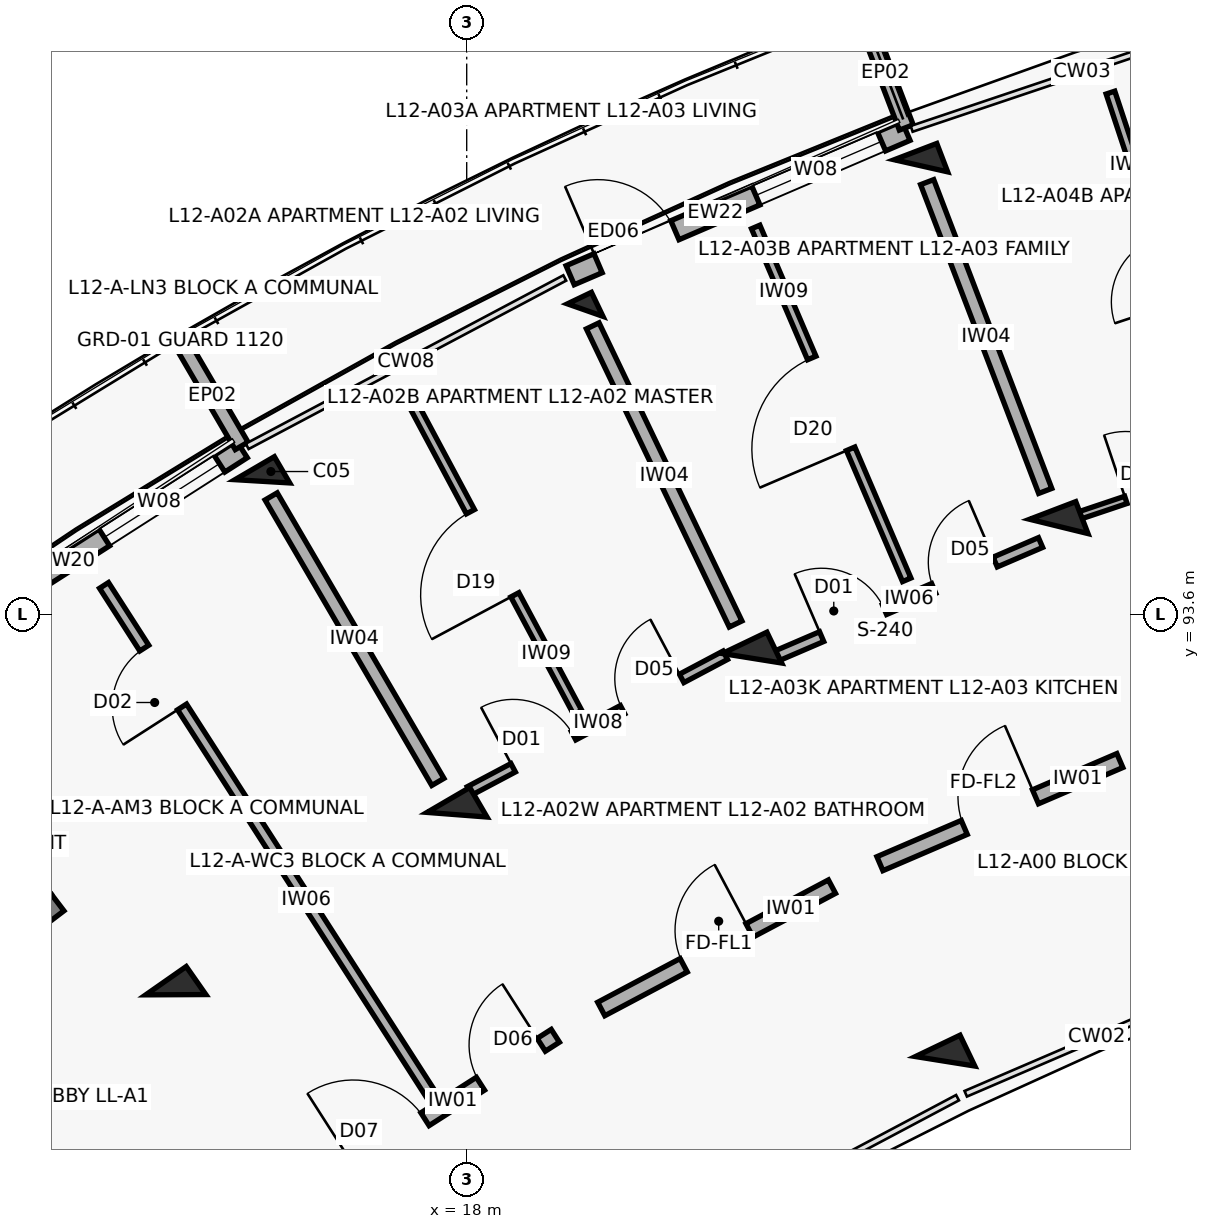
"""IFC4 building model, lengths in metres.
Left out: names, types, materials, properties, quantities, classifications, styles, units other than length and angle.
Written with IfcOpenShell. Run it as: python <this file> out.ifc"""

import sys

from ifc_helpers import new_model, si_unit, direction, frame, frame_2d, origin, origin_2d, place, context, subcontext, project, spatial, rectangle, extrude, element, fill, save


model = new_model("IFC4")
c1 = context("Model", 3, precision=1e-05, world=origin(), true_north=direction((0.0, 1.0)))
c2 = subcontext(c1, "Body", "Model", "MODEL_VIEW")
j1 = project(units=[si_unit("LENGTHUNIT", "METRE"), si_unit("PLANEANGLEUNIT", "RADIAN")], contexts=[c1])
p1 = place(None, origin())
s1 = spatial("IfcSite", under=j1, at=p1, CompositionType="ELEMENT")
p2 = place(p1, origin())
s2 = spatial("IfcBuilding", under=s1, at=p2, CompositionType="ELEMENT")
p3 = place(p2, frame((0.0, 0.0, 39.1)))
s3 = spatial("IfcBuildingStorey", under=s2, at=p3, CompositionType="ELEMENT", Elevation=39.1)
for number, where, z_axis, x_axis in (
    (1, (14.172, 88.592, 0.0), (0.0, 0.0, 1.0), (-0.573, 0.82, 0.0)),
    (2, (17.873, 90.96, 0.0), (0.0, 0.0, 1.0), (-0.504, 0.864, 0.0)),
):
    element("IfcColumn", number, at=place(p3, frame(where, z_axis=z_axis, x_axis=x_axis)), inside=s3, PredefinedType="COLUMN", context=c2, shape_type="SweptSolid", body=[
        extrude(rectangle(XDim=0.45, YDim=0.65, at=origin_2d()), origin(), (0.0, 0.0, 1.0), 3.1),
    ])
p4 = place(p3, frame((15.311, 95.347, 0.0), z_axis=(0.0, 0.0, 1.0), x_axis=(-0.504226211181, 0.863571611366, 0.0)))
e3 = element("IfcColumn", 3, at=p4, inside=s3, PredefinedType="COLUMN", context=c2, shape_type="SweptSolid", body=[
    extrude(rectangle(XDim=0.4, YDim=0.6, at=origin_2d()), origin(), (0.0, 0.0, 1.0), 3.1),
])
for number, where, z_axis, x_axis in (
    (4, (24.294, 87.716, 0.0), (0.0, 0.0, 1.0), (-0.432, 0.902, 0.0)),
    (5, (21.754, 93.019, 0.0), (0.0, 0.0, 1.0), (-0.432, 0.902, 0.0)),
):
    element("IfcColumn", number, at=place(p3, frame(where, z_axis=z_axis, x_axis=x_axis)), inside=s3, PredefinedType="COLUMN", context=c2, shape_type="SweptSolid", body=[
        extrude(rectangle(XDim=0.45, YDim=0.65, at=origin_2d()), origin(), (0.0, 0.0, 1.0), 3.1),
    ])
p5 = place(p3, frame((19.559, 97.6, 0.0), z_axis=(0.0, 0.0, 1.0), x_axis=(-0.432085748802, 0.901832526405, 0.0)))
e6 = element("IfcColumn", 6, at=p5, inside=s3, PredefinedType="COLUMN", context=c2, shape_type="SweptSolid", body=[
    extrude(rectangle(XDim=0.35, YDim=0.35, at=origin_2d()), origin(), (0.0, 0.0, 1.0), 3.1),
])
p6 = place(p3, frame((25.79, 94.753, 0.0), z_axis=(0.0, 0.0, 1.0), x_axis=(-0.357064076459, 0.934079892355, 0.0)))
e7 = element("IfcColumn", 7, at=p6, inside=s3, PredefinedType="COLUMN", context=c2, shape_type="SweptSolid", body=[
    extrude(rectangle(XDim=0.45, YDim=0.65, at=origin_2d()), origin(), (0.0, 0.0, 1.0), 3.1),
])
p7 = place(p3, frame((23.976, 99.499, 0.0), z_axis=(0.0, 0.0, 1.0), x_axis=(-0.357064076459, 0.934079892355, 0.0)))
e8 = element("IfcColumn", 8, at=p7, inside=s3, PredefinedType="COLUMN", context=c2, shape_type="SweptSolid", body=[
    extrude(rectangle(XDim=0.4, YDim=0.6, at=origin_2d()), origin(), (0.0, 0.0, 1.0), 3.1),
])
p8 = place(p3, frame((10.992, 93.176, 0.0), z_axis=(0.0, 0.0, 1.0), x_axis=(0.84226218024, 0.539068103061, 0.0)))
e9 = element("IfcWall", 9, at=p8, inside=s3, PredefinedType="SOLIDWALL", context=c2, shape_type="SweptSolid", body=[
    extrude(rectangle(XDim=4.809, YDim=0.262, at=frame_2d((2.404, 0.0))), origin(), (0.0, 0.0, 1.0), 2.25),
])
p9 = place(p8, frame((0.4, 0.0, 0.0)))
e10 = element("IfcOpeningElement", 10, at=p9, cuts=e9, PredefinedType="OPENING", context=c2, shape_type="SweptSolid", body=[
    extrude(rectangle(XDim=1.1, YDim=2.15, at=frame_2d((0.55, 1.075))), frame((0.0, 0.141, 0.0), z_axis=(0.0, -1.0, 0.0), x_axis=(1.0, 0.0, 0.0)), (0.0, 0.0, 1.0), 0.282),
])
p10 = place(p8, frame((2.659, 0.0, 0.35)))
e11 = element("IfcOpeningElement", 11, at=p10, cuts=e9, PredefinedType="OPENING", context=c2, shape_type="SweptSolid", body=[
    extrude(rectangle(XDim=1.8, YDim=1.65, at=frame_2d((0.9, 0.825))), frame((0.0, 0.141, 0.0), z_axis=(0.0, -1.0, 0.0), x_axis=(1.0, 0.0, 0.0)), (0.0, 0.0, 1.0), 0.282),
])
p11 = place(p3, frame((15.039, 95.813, 0.0), z_axis=(0.0, 0.0, 1.0), x_axis=(-0.504228145431, 0.863570481985, 0.0)))
e12 = element("IfcWall", 12, at=p11, inside=s3, PredefinedType="PARAPET", context=c2, shape_type="SweptSolid", body=[
    extrude(rectangle(XDim=1.53, YDim=0.195, at=frame_2d((0.765, 0.0))), origin(), (0.0, 0.0, 1.0), 2.25),
])
p12 = place(p3, frame((19.361, 98.059, 0.0), z_axis=(0.0, 0.0, 1.0), x_axis=(0.918711189033, 0.394930058548, 0.0)))
e13 = element("IfcWall", 13, at=p12, inside=s3, PredefinedType="SOLIDWALL", context=c2, shape_type="SweptSolid", body=[
    extrude(rectangle(XDim=4.809, YDim=0.272, at=frame_2d((2.404, 0.0))), origin(), (0.0, 0.0, 1.0), 2.25),
])
p13 = place(p12, frame((0.4, 0.0, 0.0)))
e14 = element("IfcOpeningElement", 14, at=p13, cuts=e13, PredefinedType="OPENING", context=c2, shape_type="SweptSolid", body=[
    extrude(rectangle(XDim=1.1, YDim=2.15, at=frame_2d((0.55, 1.075))), frame((0.0, 0.146, 0.0), z_axis=(0.0, -1.0, 0.0), x_axis=(1.0, 0.0, 0.0)), (0.0, 0.0, 1.0), 0.292),
])
p14 = place(p12, frame((2.659, 0.0, 0.35)))
e15 = element("IfcOpeningElement", 15, at=p14, cuts=e13, PredefinedType="OPENING", context=c2, shape_type="SweptSolid", body=[
    extrude(rectangle(XDim=1.8, YDim=1.65, at=frame_2d((0.9, 0.825))), frame((0.0, 0.146, 0.0), z_axis=(0.0, -1.0, 0.0), x_axis=(1.0, 0.0, 0.0)), (0.0, 0.0, 1.0), 0.292),
])
p15 = place(p3, frame((23.783, 100.003, 0.0), z_axis=(0.0, 0.0, 1.0), x_axis=(-0.356957296461, 0.934120703391, 0.0)))
e16 = element("IfcWall", 16, at=p15, inside=s3, PredefinedType="PARAPET", context=c2, shape_type="SweptSolid", body=[
    extrude(rectangle(XDim=1.53, YDim=0.195, at=frame_2d((0.765, 0.0))), origin(), (0.0, 0.0, 1.0), 2.25),
])
p16 = place(p3, frame((12.616, 89.807, 0.0), z_axis=(0.0, 0.0, 1.0), x_axis=(-0.795474703455, -0.605986795371, 0.0)))
e17 = element("IfcWall", 17, at=p16, inside=s3, PredefinedType="SHEAR", context=c2, shape_type="SweptSolid", body=[
    extrude(rectangle(XDim=3.39, YDim=0.28, at=frame_2d((1.695, 0.0))), origin(), (0.0, 0.0, 1.0), 3.1),
])
p17 = place(p16, frame((1.095, 0.0, 0.0)))
e18 = element("IfcOpeningElement", 18, at=p17, cuts=e17, PredefinedType="OPENING", context=c2, shape_type="SweptSolid", body=[
    extrude(rectangle(XDim=1.2, YDim=2.15, at=frame_2d((0.6, 1.075))), frame((0.0, 0.15, 0.0), z_axis=(0.0, -1.0, 0.0), x_axis=(1.0, 0.0, 0.0)), (0.0, 0.0, 1.0), 0.3),
])
p18 = place(p3, frame((16.272, 86.199, 0.0), z_axis=(0.0, 0.0, 1.0), x_axis=(0.842257205985, 0.539075874963, 0.0)))
e19 = element("IfcWall", 19, at=p18, inside=s3, PredefinedType="SOLIDWALL", context=c2, shape_type="SweptSolid", body=[
    extrude(rectangle(XDim=3.436, YDim=0.2, at=frame_2d((1.718, 0.0))), origin(), (0.0, 0.0, 1.0), 2.08),
])
p19 = place(p18, frame((0.28, 0.0, 0.0)))
e20 = element("IfcOpeningElement", 20, at=p19, cuts=e19, PredefinedType="OPENING", context=c2, shape_type="SweptSolid", body=[
    extrude(rectangle(XDim=1.12, YDim=2.15, at=frame_2d((0.56, 1.075))), frame((0.0, 0.11, 0.0), z_axis=(0.0, -1.0, 0.0), x_axis=(1.0, 0.0, 0.0)), (0.0, 0.0, 1.0), 0.22),
])
p20 = place(p18, frame((2.266, 0.0, 0.0)))
e21 = element("IfcOpeningElement", 21, at=p20, cuts=e19, PredefinedType="OPENING", context=c2, shape_type="SweptSolid", body=[
    extrude(rectangle(XDim=0.95, YDim=2.1, at=frame_2d((0.475, 1.05))), frame((0.0, 0.11, 0.0), z_axis=(0.0, -1.0, 0.0), x_axis=(1.0, 0.0, 0.0)), (0.0, 0.0, 1.0), 0.22),
])
p21 = place(p3, frame((17.524, 87.288, 0.0), z_axis=(0.0, 0.0, 1.0), x_axis=(-0.540338452216, 0.841447774408, 0.0)))
e22 = element("IfcWall", 22, at=p21, inside=s3, PredefinedType="PARTITIONING", context=c2, shape_type="SweptSolid", body=[
    extrude(rectangle(XDim=7.95, YDim=0.14, at=frame_2d((3.975, 0.0))), origin(), (0.0, 0.0, 1.0), 2.08),
])
p22 = place(p21, frame((6.05, 0.0, 0.0)))
e23 = element("IfcOpeningElement", 23, at=p22, cuts=e22, PredefinedType="OPENING", context=c2, shape_type="SweptSolid", body=[
    extrude(rectangle(XDim=0.92, YDim=2.1, at=frame_2d((0.46, 1.05))), frame((0.0, 0.08, 0.0), z_axis=(0.0, -1.0, 0.0), x_axis=(1.0, 0.0, 0.0)), (0.0, 0.0, 1.0), 0.16),
])
p23 = place(p3, frame((19.77, 88.404, 0.0), z_axis=(0.0, 0.0, 1.0), x_axis=(0.883410853063, 0.468599258099, 0.0)))
e24 = element("IfcWall", 24, at=p23, inside=s3, PredefinedType="SOLIDWALL", context=c2, shape_type="SweptSolid", body=[
    extrude(rectangle(XDim=3.436, YDim=0.2, at=frame_2d((1.718, 0.0))), origin(), (0.0, 0.0, 1.0), 2.08),
])
p24 = place(p23, frame((1.228, 0.0, 0.0)))
e25 = element("IfcOpeningElement", 25, at=p24, cuts=e24, PredefinedType="OPENING", context=c2, shape_type="SweptSolid", body=[
    extrude(rectangle(XDim=0.98, YDim=2.15, at=frame_2d((0.49, 1.075))), frame((0.0, 0.11, 0.0), z_axis=(0.0, -1.0, 0.0), x_axis=(1.0, 0.0, 0.0)), (0.0, 0.0, 1.0), 0.22),
])
p25 = place(p3, frame((18.037, 91.273, 0.0), z_axis=(0.0, 0.0, 1.0), x_axis=(0.883441603894, 0.468541281543, 0.0)))
e26 = element("IfcWall", 26, at=p25, inside=s3, PredefinedType="PARTITIONING", context=c2, shape_type="SweptSolid", body=[
    extrude(rectangle(XDim=3.81, YDim=0.125, at=frame_2d((1.905, 0.0))), origin(), (0.0, 0.0, 1.0), 2.08),
])
p26 = place(p25, frame((0.65, 0.0, 0.0)))
e27 = element("IfcOpeningElement", 27, at=p26, cuts=e26, PredefinedType="OPENING", context=c2, shape_type="SweptSolid", body=[
    extrude(rectangle(XDim=0.9, YDim=2.1, at=frame_2d((0.45, 1.05))), frame((0.0, 0.073, 0.0), z_axis=(0.0, -1.0, 0.0), x_axis=(1.0, 0.0, 0.0)), (0.0, 0.0, 1.0), 0.145),
])
p27 = place(p25, frame((2.28, 0.0, 0.0)))
e28 = element("IfcOpeningElement", 28, at=p27, cuts=e26, PredefinedType="OPENING", context=c2, shape_type="SweptSolid", body=[
    extrude(rectangle(XDim=0.88, YDim=2.1, at=frame_2d((0.44, 1.05))), frame((0.0, 0.073, 0.0), z_axis=(0.0, -1.0, 0.0), x_axis=(1.0, 0.0, 0.0)), (0.0, 0.0, 1.0), 0.145),
])
p28 = place(p3, frame((19.46, 92.306, 0.0), z_axis=(0.0, 0.0, 1.0), x_axis=(-0.471228378949, 0.88201123285, 0.0)))
e29 = element("IfcWall", 29, at=p28, inside=s3, PredefinedType="PARTITIONING", context=c2, shape_type="SweptSolid", body=[
    extrude(rectangle(XDim=4.75, YDim=0.12, at=frame_2d((2.375, 0.0))), origin(), (0.0, 0.0, 1.0), 2.08),
])
p29 = place(p28, frame((1.755, 0.0, 0.0)))
e30 = element("IfcOpeningElement", 30, at=p29, cuts=e29, PredefinedType="OPENING", context=c2, shape_type="SweptSolid", body=[
    extrude(rectangle(XDim=1.24, YDim=2.1, at=frame_2d((0.62, 1.05))), frame((0.0, 0.07, 0.0), z_axis=(0.0, -1.0, 0.0), x_axis=(1.0, 0.0, 0.0)), (0.0, 0.0, 1.0), 0.14),
])
p30 = place(p3, frame((17.621, 91.392, 0.0), z_axis=(0.0, 0.0, 1.0), x_axis=(-0.504216452091, 0.863577309475, 0.0)))
e31 = element("IfcWall", 31, at=p30, inside=s3, PredefinedType="SOLIDWALL", context=c2, shape_type="SweptSolid", body=[
    extrude(rectangle(XDim=4.35, YDim=0.185, at=frame_2d((2.175, 0.0))), origin(), (0.0, 0.0, 1.0), 2.08),
])
p31 = place(p3, frame((23.437, 90.316, 0.0), z_axis=(0.0, 0.0, 1.0), x_axis=(0.918718172399, 0.394913813008, 0.0)))
e32 = element("IfcWall", 32, at=p31, inside=s3, PredefinedType="SOLIDWALL", context=c2, shape_type="SweptSolid", body=[
    extrude(rectangle(XDim=3.436, YDim=0.2, at=frame_2d((1.718, 0.0))), origin(), (0.0, 0.0, 1.0), 2.08),
])
p32 = place(p31, frame((1.208, 0.0, 0.0)))
e33 = element("IfcOpeningElement", 33, at=p32, cuts=e32, PredefinedType="OPENING", context=c2, shape_type="SweptSolid", body=[
    extrude(rectangle(XDim=1.02, YDim=2.15, at=frame_2d((0.51, 1.075))), frame((0.0, 0.11, 0.0), z_axis=(0.0, -1.0, 0.0), x_axis=(1.0, 0.0, 0.0)), (0.0, 0.0, 1.0), 0.22),
])
p33 = place(p3, frame((22.073, 93.047, 0.0), z_axis=(0.0, 0.0, 1.0), x_axis=(0.918737522346, 0.394868794707, 0.0)))
e34 = element("IfcWall", 34, at=p33, inside=s3, PredefinedType="PARTITIONING", context=c2, shape_type="SweptSolid", body=[
    extrude(rectangle(XDim=3.785, YDim=0.14, at=frame_2d((1.893, 0.0))), origin(), (0.0, 0.0, 1.0), 2.08),
])
p34 = place(p33, frame((0.65, 0.0, 0.0)))
e35 = element("IfcOpeningElement", 35, at=p34, cuts=e34, PredefinedType="OPENING", context=c2, shape_type="SweptSolid", body=[
    extrude(rectangle(XDim=0.9, YDim=2.1, at=frame_2d((0.45, 1.05))), frame((0.0, 0.08, 0.0), z_axis=(0.0, -1.0, 0.0), x_axis=(1.0, 0.0, 0.0)), (0.0, 0.0, 1.0), 0.16),
])
p35 = place(p33, frame((2.255, 0.0, 0.0)))
e36 = element("IfcOpeningElement", 36, at=p35, cuts=e34, PredefinedType="OPENING", context=c2, shape_type="SweptSolid", body=[
    extrude(rectangle(XDim=0.88, YDim=2.1, at=frame_2d((0.44, 1.05))), frame((0.0, 0.08, 0.0), z_axis=(0.0, -1.0, 0.0), x_axis=(1.0, 0.0, 0.0)), (0.0, 0.0, 1.0), 0.16),
])
p36 = place(p3, frame((23.789, 94.051, 0.0), z_axis=(0.0, 0.0, 1.0), x_axis=(-0.393539995583, 0.919307495823, 0.0)))
e37 = element("IfcWall", 37, at=p36, inside=s3, PredefinedType="PARTITIONING", context=c2, shape_type="SweptSolid", body=[
    extrude(rectangle(XDim=5.05, YDim=0.12, at=frame_2d((2.525, 0.0))), origin(), (0.0, 0.0, 1.0), 2.08),
])
p37 = place(p36, frame((1.875, 0.0, 0.0)))
e38 = element("IfcOpeningElement", 38, at=p37, cuts=e37, PredefinedType="OPENING", context=c2, shape_type="SweptSolid", body=[
    extrude(rectangle(XDim=1.3, YDim=2.1, at=frame_2d((0.65, 1.05))), frame((0.0, 0.07, 0.0), z_axis=(0.0, -1.0, 0.0), x_axis=(1.0, 0.0, 0.0)), (0.0, 0.0, 1.0), 0.14),
])
p38 = place(p3, frame((21.538, 93.469, 0.0), z_axis=(0.0, 0.0, 1.0), x_axis=(-0.432086898897, 0.901831975371, 0.0)))
e39 = element("IfcWall", 39, at=p38, inside=s3, PredefinedType="SOLIDWALL", context=c2, shape_type="SweptSolid", body=[
    extrude(rectangle(XDim=4.35, YDim=0.185, at=frame_2d((2.175, 0.0))), origin(), (0.0, 0.0, 1.0), 2.08),
])
p39 = place(p3, frame((26.056, 94.896, 0.0), z_axis=(0.0, 0.0, 1.0), x_axis=(0.947876567739, 0.318637744673, 0.0)))
e40 = element("IfcWall", 40, at=p39, inside=s3, PredefinedType="PARTITIONING", context=c2, shape_type="SweptSolid", body=[
    extrude(rectangle(XDim=3.797, YDim=0.1, at=frame_2d((1.899, 0.0))), origin(), (0.0, 0.0, 1.0), 2.08),
])
p40 = place(p39, frame((0.65, 0.0, 0.0)))
e41 = element("IfcOpeningElement", 41, at=p40, cuts=e40, PredefinedType="OPENING", context=c2, shape_type="SweptSolid", body=[
    extrude(rectangle(XDim=0.9, YDim=2.1, at=frame_2d((0.45, 1.05))), frame((0.0, 0.06, 0.0), z_axis=(0.0, -1.0, 0.0), x_axis=(1.0, 0.0, 0.0)), (0.0, 0.0, 1.0), 0.12),
])
p41 = place(p39, frame((2.267, 0.0, 0.0)))
e42 = element("IfcOpeningElement", 42, at=p41, cuts=e40, PredefinedType="OPENING", context=c2, shape_type="SweptSolid", body=[
    extrude(rectangle(XDim=0.88, YDim=2.1, at=frame_2d((0.44, 1.05))), frame((0.0, 0.06, 0.0), z_axis=(0.0, -1.0, 0.0), x_axis=(1.0, 0.0, 0.0)), (0.0, 0.0, 1.0), 0.12),
])
p42 = place(p3, frame((28.01, 95.81, 0.0), z_axis=(0.0, 0.0, 1.0), x_axis=(-0.314343770763, 0.949309219266, 0.0)))
e43 = element("IfcWall", 43, at=p42, inside=s3, PredefinedType="PARTITIONING", context=c2, shape_type="SweptSolid", body=[
    extrude(rectangle(XDim=4.9, YDim=0.12, at=frame_2d((2.45, 0.0))), origin(), (0.0, 0.0, 1.0), 2.08),
])
p43 = place(p42, frame((2.0, 0.0, 0.0)))
e44 = element("IfcOpeningElement", 44, at=p43, cuts=e43, PredefinedType="OPENING", context=c2, shape_type="SweptSolid", body=[
    extrude(rectangle(XDim=0.9, YDim=2.1, at=frame_2d((0.45, 1.05))), frame((0.0, 0.07, 0.0), z_axis=(0.0, -1.0, 0.0), x_axis=(1.0, 0.0, 0.0)), (0.0, 0.0, 1.0), 0.14),
])
p44 = place(p3, frame((25.611, 95.22, 0.0), z_axis=(0.0, 0.0, 1.0), x_axis=(-0.357064016205, 0.934079915388, 0.0)))
e45 = element("IfcWall", 45, at=p44, inside=s3, PredefinedType="SOLIDWALL", context=c2, shape_type="SweptSolid", body=[
    extrude(rectangle(XDim=4.35, YDim=0.185, at=frame_2d((2.175, 0.0))), origin(), (0.0, 0.0, 1.0), 2.08),
])
p45 = place(p10, origin())
e46 = element("IfcWindow", 46, at=p45, inside=s3, PartitioningType="TRIPLE_PANEL_VERTICAL", PredefinedType="WINDOW", context=c2, shape_type="SweptSolid", body=[
    extrude(rectangle(XDim=1.8, YDim=1.65, at=frame_2d((0.9, 0.825))), frame((0.0, 0.03, 0.0), z_axis=(0.0, -1.0, 0.0), x_axis=(1.0, 0.0, 0.0)), (0.0, 0.0, 1.0), 0.06),
])
fill(e11, e46)
p46 = place(p13, origin())
e47 = element("IfcDoor", 47, at=p46, inside=s3, OperationType="SINGLE_SWING_LEFT", PredefinedType="DOOR", context=c2, shape_type="SweptSolid", body=[
    extrude(rectangle(XDim=1.1, YDim=2.15, at=frame_2d((0.55, 1.075))), frame((0.0, 0.025, 0.0), z_axis=(0.0, -1.0, 0.0), x_axis=(1.0, 0.0, 0.0)), (0.0, 0.0, 1.0), 0.05),
])
fill(e14, e47)
p47 = place(p14, origin())
e48 = element("IfcWindow", 48, at=p47, inside=s3, PartitioningType="TRIPLE_PANEL_VERTICAL", PredefinedType="WINDOW", context=c2, shape_type="SweptSolid", body=[
    extrude(rectangle(XDim=1.8, YDim=1.65, at=frame_2d((0.9, 0.825))), frame((0.0, 0.03, 0.0), z_axis=(0.0, -1.0, 0.0), x_axis=(1.0, 0.0, 0.0)), (0.0, 0.0, 1.0), 0.06),
])
fill(e15, e48)
p48 = place(p19, origin())
e49 = element("IfcDoor", 49, at=p48, inside=s3, OperationType="SINGLE_SWING_LEFT", PredefinedType="DOOR", context=c2, shape_type="SweptSolid", body=[
    extrude(rectangle(XDim=1.12, YDim=2.15, at=frame_2d((0.56, 1.075))), frame((0.0, 0.025, 0.0), z_axis=(0.0, -1.0, 0.0), x_axis=(1.0, 0.0, 0.0)), (0.0, 0.0, 1.0), 0.05),
])
fill(e20, e49)
p49 = place(p20, origin())
e50 = element("IfcDoor", 50, at=p49, inside=s3, OperationType="SINGLE_SWING_RIGHT", PredefinedType="DOOR", context=c2, shape_type="SweptSolid", body=[
    extrude(rectangle(XDim=0.95, YDim=2.1, at=frame_2d((0.475, 1.05))), frame((0.0, 0.025, 0.0), z_axis=(0.0, -1.0, 0.0), x_axis=(1.0, 0.0, 0.0)), (0.0, 0.0, 1.0), 0.05),
])
fill(e21, e50)
p50 = place(p22, origin())
e51 = element("IfcDoor", 51, at=p50, inside=s3, OperationType="SINGLE_SWING_LEFT", PredefinedType="DOOR", context=c2, shape_type="SweptSolid", body=[
    extrude(rectangle(XDim=0.92, YDim=2.1, at=frame_2d((0.46, 1.05))), frame((0.0, 0.025, 0.0), z_axis=(0.0, -1.0, 0.0), x_axis=(1.0, 0.0, 0.0)), (0.0, 0.0, 1.0), 0.05),
])
fill(e23, e51)
p51 = place(p24, origin())
e52 = element("IfcDoor", 52, at=p51, inside=s3, OperationType="SINGLE_SWING_RIGHT", PredefinedType="DOOR", context=c2, shape_type="SweptSolid", body=[
    extrude(rectangle(XDim=0.98, YDim=2.15, at=frame_2d((0.49, 1.075))), frame((0.0, 0.025, 0.0), z_axis=(0.0, -1.0, 0.0), x_axis=(1.0, 0.0, 0.0)), (0.0, 0.0, 1.0), 0.05),
])
fill(e25, e52)
p52 = place(p26, origin())
e53 = element("IfcDoor", 53, at=p52, inside=s3, OperationType="SINGLE_SWING_LEFT", PredefinedType="DOOR", context=c2, shape_type="SweptSolid", body=[
    extrude(rectangle(XDim=0.9, YDim=2.1, at=frame_2d((0.45, 1.05))), frame((0.0, 0.025, 0.0), z_axis=(0.0, -1.0, 0.0), x_axis=(1.0, 0.0, 0.0)), (0.0, 0.0, 1.0), 0.05),
])
fill(e27, e53)
p53 = place(p27, origin())
e54 = element("IfcDoor", 54, at=p53, inside=s3, OperationType="SINGLE_SWING_RIGHT", PredefinedType="DOOR", context=c2, shape_type="SweptSolid", body=[
    extrude(rectangle(XDim=0.88, YDim=2.1, at=frame_2d((0.44, 1.05))), frame((0.0, 0.025, 0.0), z_axis=(0.0, -1.0, 0.0), x_axis=(1.0, 0.0, 0.0)), (0.0, 0.0, 1.0), 0.05),
])
fill(e28, e54)
p54 = place(p29, origin())
e55 = element("IfcDoor", 55, at=p54, inside=s3, OperationType="SINGLE_SWING_LEFT", PredefinedType="DOOR", context=c2, shape_type="SweptSolid", body=[
    extrude(rectangle(XDim=1.24, YDim=2.1, at=frame_2d((0.62, 1.05))), frame((0.0, 0.025, 0.0), z_axis=(0.0, -1.0, 0.0), x_axis=(1.0, 0.0, 0.0)), (0.0, 0.0, 1.0), 0.05),
])
fill(e30, e55)
p55 = place(p32, origin())
e56 = element("IfcDoor", 56, at=p55, inside=s3, OperationType="SINGLE_SWING_RIGHT", PredefinedType="DOOR", context=c2, shape_type="SweptSolid", body=[
    extrude(rectangle(XDim=1.02, YDim=2.15, at=frame_2d((0.51, 1.075))), frame((0.0, 0.025, 0.0), z_axis=(0.0, -1.0, 0.0), x_axis=(1.0, 0.0, 0.0)), (0.0, 0.0, 1.0), 0.05),
])
fill(e33, e56)
p56 = place(p34, origin())
e57 = element("IfcDoor", 57, at=p56, inside=s3, OperationType="SINGLE_SWING_LEFT", PredefinedType="DOOR", context=c2, shape_type="SweptSolid", body=[
    extrude(rectangle(XDim=0.9, YDim=2.1, at=frame_2d((0.45, 1.05))), frame((0.0, 0.025, 0.0), z_axis=(0.0, -1.0, 0.0), x_axis=(1.0, 0.0, 0.0)), (0.0, 0.0, 1.0), 0.05),
])
fill(e35, e57)
p57 = place(p35, origin())
e58 = element("IfcDoor", 58, at=p57, inside=s3, OperationType="SINGLE_SWING_RIGHT", PredefinedType="DOOR", context=c2, shape_type="SweptSolid", body=[
    extrude(rectangle(XDim=0.88, YDim=2.1, at=frame_2d((0.44, 1.05))), frame((0.0, 0.025, 0.0), z_axis=(0.0, -1.0, 0.0), x_axis=(1.0, 0.0, 0.0)), (0.0, 0.0, 1.0), 0.05),
])
fill(e36, e58)
p58 = place(p37, origin())
e59 = element("IfcDoor", 59, at=p58, inside=s3, OperationType="SINGLE_SWING_LEFT", PredefinedType="DOOR", context=c2, shape_type="SweptSolid", body=[
    extrude(rectangle(XDim=1.3, YDim=2.1, at=frame_2d((0.65, 1.05))), frame((0.0, 0.025, 0.0), z_axis=(0.0, -1.0, 0.0), x_axis=(1.0, 0.0, 0.0)), (0.0, 0.0, 1.0), 0.05),
])
fill(e38, e59)
p59 = place(p40, origin())
e60 = element("IfcDoor", 60, at=p59, inside=s3, OperationType="SINGLE_SWING_LEFT", PredefinedType="DOOR", context=c2, shape_type="SweptSolid", body=[
    extrude(rectangle(XDim=0.9, YDim=2.1, at=frame_2d((0.45, 1.05))), frame((0.0, 0.025, 0.0), z_axis=(0.0, -1.0, 0.0), x_axis=(1.0, 0.0, 0.0)), (0.0, 0.0, 1.0), 0.05),
])
fill(e41, e60)
save(model, sys.argv[1])
